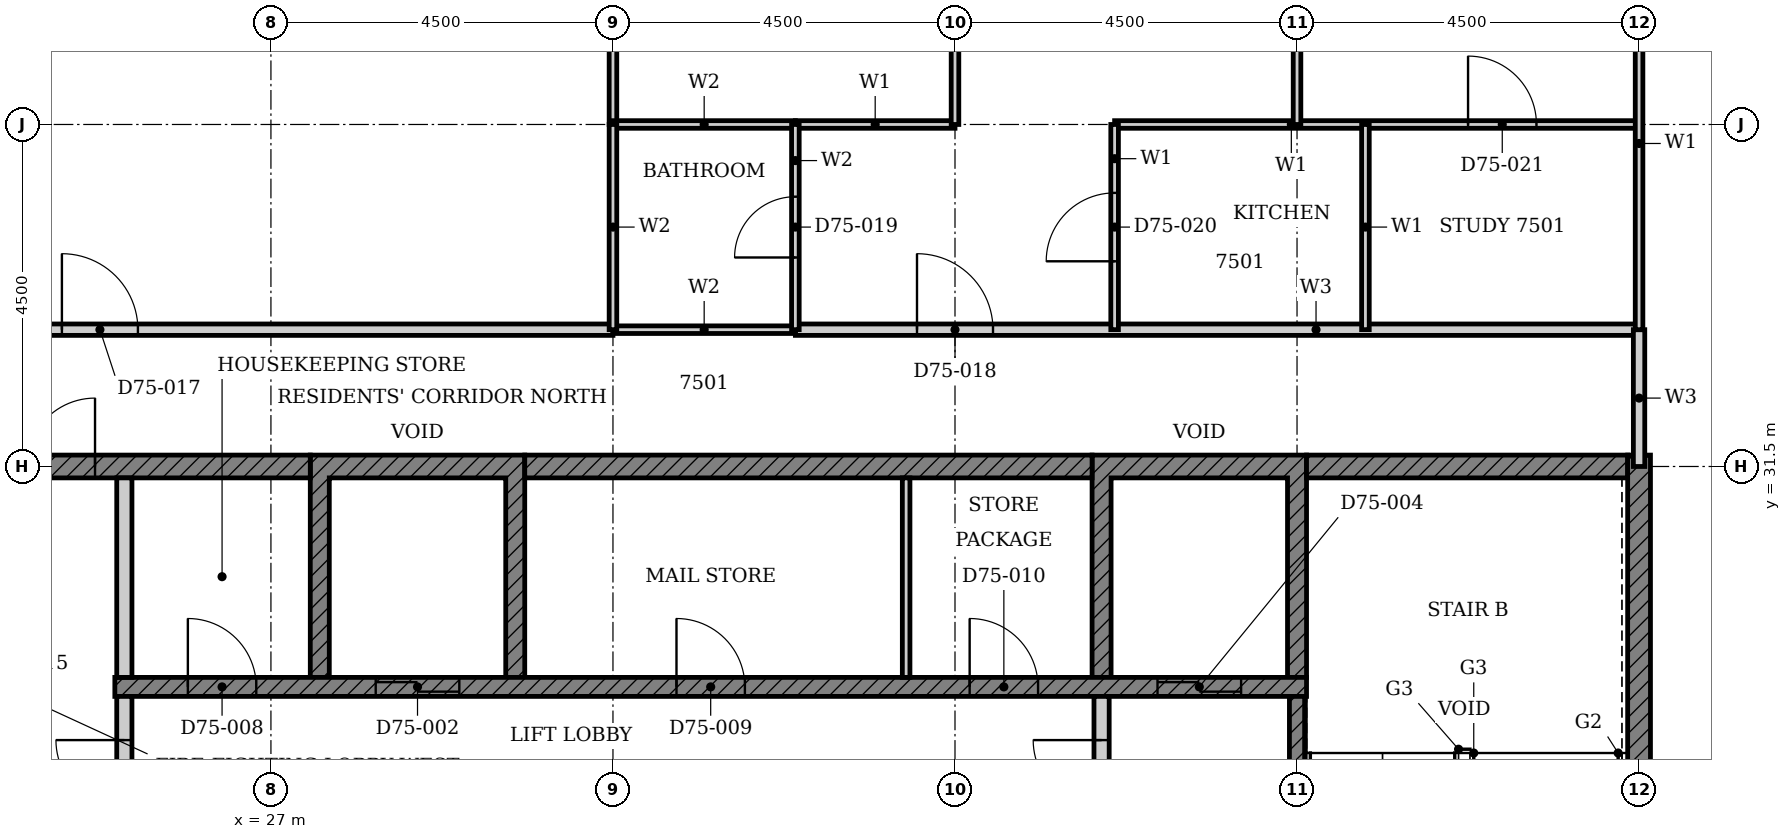
"""IFC4 building model, lengths in metres.
Left out: names, types, materials, properties, quantities, classifications, styles, units other than length and angle.
Written with IfcOpenShell. Run it as: python <this file> out.ifc"""

import sys

from ifc_helpers import new_model, si_unit, direction, frame, frame_2d, origin, place, context, subcontext, project, spatial, polyline, rectangle, outline, extrude, element, fill, save


model = new_model("IFC4")
c1 = context("Model", 3, precision=1e-05, world=origin(), true_north=direction((0.0, 1.0)))
c2 = subcontext(c1, "Body", "Model", "MODEL_VIEW")
j1 = project(units=[si_unit("LENGTHUNIT", "METRE"), si_unit("PLANEANGLEUNIT", "RADIAN")], contexts=[c1])
p1 = place(None, origin())
s1 = spatial("IfcSite", under=j1, at=p1, CompositionType="ELEMENT")
p2 = place(p1, origin())
s2 = spatial("IfcBuilding", under=s1, at=p2, CompositionType="ELEMENT")
p3 = place(p2, frame((0.0, 0.0, 294.5)))
s3 = spatial("IfcBuildingStorey", under=s2, at=p3, CompositionType="ELEMENT", Elevation=294.5)
p4 = place(p3, origin())
e1 = element("IfcWall", 1, at=p4, inside=s3, PredefinedType="SHEAR", context=c2, shape_type="SweptSolid", body=[
    extrude(outline(polyline([(27.518, 28.725), (27.768, 28.725), (27.768, 31.35), (30.089, 31.35), (30.089, 28.725), (30.339, 28.725), (30.339, 31.65), (27.518, 31.65), (27.518, 28.725)])), origin(), (0.0, 0.0, 1.0), 3.4),
])
p5 = place(p3, origin())
e2 = element("IfcWall", 2, at=p5, inside=s3, PredefinedType="SHEAR", context=c2, shape_type="SweptSolid", body=[
    extrude(outline(polyline([(37.803, 28.725), (38.053, 28.725), (38.053, 31.35), (40.375, 31.35), (40.375, 28.725), (40.625, 28.725), (40.625, 31.65), (37.803, 31.65), (37.803, 28.725)])), origin(), (0.0, 0.0, 1.0), 3.4),
])
p6 = place(p3, frame((18.15, 31.5, 0.0), z_axis=(0.0, 0.0, 1.0), x_axis=(1.0, 0.0, 0.0)))
e3 = element("IfcWall", 3, at=p6, inside=s3, PredefinedType="SHEAR", context=c2, shape_type="SweptSolid", body=[
    extrude(rectangle(XDim=9.368, YDim=0.3, at=frame_2d((4.684, 0.0))), origin(), (0.0, 0.0, 1.0), 3.4),
])
p7 = place(p6, frame((4.736, 0.0, 0.0)))
e4 = element("IfcOpeningElement", 4, at=p7, cuts=e3, PredefinedType="OPENING", context=c2, shape_type="SweptSolid", body=[
    extrude(rectangle(XDim=1.8, YDim=2.1, at=frame_2d((0.9, 1.05))), frame((0.0, 0.16, 0.0), z_axis=(0.0, -1.0, 0.0), x_axis=(1.0, 0.0, 0.0)), (0.0, 0.0, 1.0), 0.32),
])
p8 = place(p3, frame((30.339, 31.5, 0.0), z_axis=(0.0, 0.0, 1.0), x_axis=(1.0, 0.0, 0.0)))
e5 = element("IfcWall", 5, at=p8, inside=s3, PredefinedType="SHEAR", context=c2, shape_type="SweptSolid", body=[
    extrude(rectangle(XDim=7.464, YDim=0.3, at=frame_2d((3.732, 0.0))), origin(), (0.0, 0.0, 1.0), 3.4),
])
p9 = place(p3, frame((40.625, 31.5, 0.0), z_axis=(0.0, 0.0, 1.0), x_axis=(1.0, 0.0, 0.0)))
e6 = element("IfcWall", 6, at=p9, inside=s3, PredefinedType="SHEAR", context=c2, shape_type="SweptSolid", body=[
    extrude(rectangle(XDim=4.225, YDim=0.3, at=frame_2d((2.113, 0.0))), origin(), (0.0, 0.0, 1.0), 3.4),
])
p10 = place(p3, frame((45.0, 22.35, 0.0), z_axis=(0.0, 0.0, 1.0), x_axis=(0.0, 1.0, 0.0)))
e7 = element("IfcWall", 7, at=p10, inside=s3, PredefinedType="SHEAR", context=c2, shape_type="SweptSolid", body=[
    extrude(rectangle(XDim=9.3, YDim=0.3, at=frame_2d((4.65, 0.0))), origin(), (0.0, 0.0, 1.0), 3.4),
])
p11 = place(p3, frame((24.947, 28.6, 0.0), z_axis=(0.0, 0.0, 1.0), x_axis=(1.0, 0.0, 0.0)))
e8 = element("IfcWall", 8, at=p11, inside=s3, PredefinedType="SHEAR", context=c2, shape_type="SweptSolid", body=[
    extrude(rectangle(XDim=15.678, YDim=0.25, at=frame_2d((7.839, 0.0))), origin(), (0.0, 0.0, 1.0), 3.4),
])
p12 = place(p11, frame((3.432, 0.0, 0.0)))
e9 = element("IfcOpeningElement", 9, at=p12, cuts=e8, PredefinedType="OPENING", context=c2, shape_type="SweptSolid", body=[
    extrude(rectangle(XDim=1.1, YDim=2.1, at=frame_2d((0.55, 1.05))), frame((0.0, 0.135, 0.0), z_axis=(0.0, -1.0, 0.0), x_axis=(1.0, 0.0, 0.0)), (0.0, 0.0, 1.0), 0.27),
])
p13 = place(p11, frame((13.718, 0.0, 0.0)))
e10 = element("IfcOpeningElement", 10, at=p13, cuts=e8, PredefinedType="OPENING", context=c2, shape_type="SweptSolid", body=[
    extrude(rectangle(XDim=1.1, YDim=2.1, at=frame_2d((0.55, 1.05))), frame((0.0, 0.135, 0.0), z_axis=(0.0, -1.0, 0.0), x_axis=(1.0, 0.0, 0.0)), (0.0, 0.0, 1.0), 0.27),
])
p14 = place(p11, frame((0.961, 0.0, 0.0)))
e11 = element("IfcOpeningElement", 11, at=p14, cuts=e8, PredefinedType="OPENING", context=c2, shape_type="SweptSolid", body=[
    extrude(rectangle(XDim=0.9, YDim=2.1, at=frame_2d((0.45, 1.05))), frame((0.0, 0.135, 0.0), z_axis=(0.0, -1.0, 0.0), x_axis=(1.0, 0.0, 0.0)), (0.0, 0.0, 1.0), 0.27),
])
p15 = place(p11, frame((7.389, 0.0, 0.0)))
e12 = element("IfcOpeningElement", 12, at=p15, cuts=e8, PredefinedType="OPENING", context=c2, shape_type="SweptSolid", body=[
    extrude(rectangle(XDim=0.9, YDim=2.1, at=frame_2d((0.45, 1.05))), frame((0.0, 0.135, 0.0), z_axis=(0.0, -1.0, 0.0), x_axis=(1.0, 0.0, 0.0)), (0.0, 0.0, 1.0), 0.27),
])
p16 = place(p11, frame((11.246, 0.0, 0.0)))
e13 = element("IfcOpeningElement", 13, at=p16, cuts=e8, PredefinedType="OPENING", context=c2, shape_type="SweptSolid", body=[
    extrude(rectangle(XDim=0.9, YDim=2.1, at=frame_2d((0.45, 1.05))), frame((0.0, 0.135, 0.0), z_axis=(0.0, -1.0, 0.0), x_axis=(1.0, 0.0, 0.0)), (0.0, 0.0, 1.0), 0.27),
])
p17 = place(p3, frame((25.072, 28.725, 0.0), z_axis=(0.0, 0.0, 1.0), x_axis=(0.0, 1.0, 0.0)))
e14 = element("IfcWall", 14, at=p17, inside=s3, PredefinedType="PARTITIONING", context=c2, shape_type="SweptSolid", body=[
    extrude(rectangle(XDim=2.625, YDim=0.2, at=frame_2d((1.312, 0.0))), origin(), (0.0, 0.0, 1.0), 3.4),
])
p18 = place(p3, frame((35.357, 28.725, 0.0), z_axis=(0.0, 0.0, 1.0), x_axis=(0.0, 1.0, 0.0)))
e15 = element("IfcWall", 15, at=p18, inside=s3, PredefinedType="PARTITIONING", context=c2, shape_type="SweptSolid", body=[
    extrude(rectangle(XDim=2.625, YDim=0.1, at=frame_2d((1.312, 0.0))), origin(), (0.0, 0.0, 1.0), 3.4),
])
p19 = place(p3, frame((40.5, 22.65, 0.0), z_axis=(0.0, 0.0, 1.0), x_axis=(0.0, 1.0, 0.0)))
e16 = element("IfcWall", 16, at=p19, inside=s3, PredefinedType="SHEAR", context=c2, shape_type="SweptSolid", body=[
    extrude(rectangle(XDim=5.825, YDim=0.2, at=frame_2d((2.913, 0.0))), origin(), (0.0, 0.0, 1.0), 3.4),
])
p20 = place(p19, frame((0.25, 0.0, 0.0)))
e17 = element("IfcOpeningElement", 17, at=p20, cuts=e16, PredefinedType="OPENING", context=c2, shape_type="SweptSolid", body=[
    extrude(rectangle(XDim=1.8, YDim=2.1, at=frame_2d((0.9, 1.05))), frame((0.0, 0.11, 0.0), z_axis=(0.0, -1.0, 0.0), x_axis=(1.0, 0.0, 0.0)), (0.0, 0.0, 1.0), 0.22),
])
p21 = place(p3, frame((25.072, 25.525, 0.0), z_axis=(0.0, 0.0, 1.0), x_axis=(0.0, 1.0, 0.0)))
e18 = element("IfcWall", 18, at=p21, inside=s3, PredefinedType="PARTITIONING", context=c2, shape_type="SweptSolid", body=[
    extrude(rectangle(XDim=2.95, YDim=0.2, at=frame_2d((1.475, 0.0))), origin(), (0.0, 0.0, 1.0), 3.4),
])
p22 = place(p21, frame((0.575, 0.0, 0.0)))
e19 = element("IfcOpeningElement", 19, at=p22, cuts=e18, PredefinedType="OPENING", context=c2, shape_type="SweptSolid", body=[
    extrude(rectangle(XDim=1.8, YDim=2.1, at=frame_2d((0.9, 1.05))), frame((0.0, 0.11, 0.0), z_axis=(0.0, -1.0, 0.0), x_axis=(1.0, 0.0, 0.0)), (0.0, 0.0, 1.0), 0.22),
])
p23 = place(p3, frame((37.928, 25.525, 0.0), z_axis=(0.0, 0.0, 1.0), x_axis=(0.0, 1.0, 0.0)))
e20 = element("IfcWall", 20, at=p23, inside=s3, PredefinedType="PARTITIONING", context=c2, shape_type="SweptSolid", body=[
    extrude(rectangle(XDim=2.95, YDim=0.2, at=frame_2d((1.475, 0.0))), origin(), (0.0, 0.0, 1.0), 3.4),
])
p24 = place(p23, frame((0.575, 0.0, 0.0)))
e21 = element("IfcOpeningElement", 21, at=p24, cuts=e20, PredefinedType="OPENING", context=c2, shape_type="SweptSolid", body=[
    extrude(rectangle(XDim=1.8, YDim=2.1, at=frame_2d((0.9, 1.05))), frame((0.0, 0.11, 0.0), z_axis=(0.0, -1.0, 0.0), x_axis=(1.0, 0.0, 0.0)), (0.0, 0.0, 1.0), 0.22),
])
p25 = place(p3, frame((18.0, 33.3, 0.0), z_axis=(0.0, 0.0, 1.0), x_axis=(1.0, 0.0, 0.0)))
e22 = element("IfcWall", 22, at=p25, inside=s3, PredefinedType="PARTITIONING", context=c2, shape_type="SweptSolid", body=[
    extrude(rectangle(XDim=13.5, YDim=0.15, at=frame_2d((6.75, 0.0))), origin(), (0.0, 0.0, 1.0), 3.4),
])
p26 = place(p25, frame((6.25, 0.0, 0.0)))
e23 = element("IfcOpeningElement", 23, at=p26, cuts=e22, PredefinedType="OPENING", context=c2, shape_type="SweptSolid", body=[
    extrude(rectangle(XDim=1.0, YDim=2.1, at=frame_2d((0.5, 1.05))), frame((0.0, 0.085, 0.0), z_axis=(0.0, -1.0, 0.0), x_axis=(1.0, 0.0, 0.0)), (0.0, 0.0, 1.0), 0.17),
])
p27 = place(p3, frame((33.9, 33.3, 0.0), z_axis=(0.0, 0.0, 1.0), x_axis=(1.0, 0.0, 0.0)))
e24 = element("IfcWall", 24, at=p27, inside=s3, PredefinedType="PARTITIONING", context=c2, shape_type="SweptSolid", body=[
    extrude(rectangle(XDim=11.1, YDim=0.15, at=frame_2d((5.55, 0.0))), origin(), (0.0, 0.0, 1.0), 3.4),
])
p28 = place(p27, frame((1.6, 0.0, 0.0)))
e25 = element("IfcOpeningElement", 25, at=p28, cuts=e24, PredefinedType="OPENING", context=c2, shape_type="SweptSolid", body=[
    extrude(rectangle(XDim=1.0, YDim=2.2, at=frame_2d((0.5, 1.1))), frame((0.0, 0.085, 0.0), z_axis=(0.0, -1.0, 0.0), x_axis=(1.0, 0.0, 0.0)), (0.0, 0.0, 1.0), 0.17),
])
p29 = place(p3, frame((45.0, 31.5, 0.0), z_axis=(0.0, 0.0, 1.0), x_axis=(0.0, 1.0, 0.0)))
e26 = element("IfcWall", 26, at=p29, inside=s3, PredefinedType="PARTITIONING", context=c2, shape_type="SweptSolid", body=[
    extrude(rectangle(XDim=1.8, YDim=0.15, at=frame_2d((0.9, 0.0))), origin(), (0.0, 0.0, 1.0), 3.4),
])
p30 = place(p3, frame((33.9, 36.0, 0.0), z_axis=(0.0, 0.0, 1.0), x_axis=(1.0, 0.0, 0.0)))
e27 = element("IfcWall", 27, at=p30, inside=s3, PredefinedType="PARTITIONING", context=c2, shape_type="SweptSolid", body=[
    extrude(rectangle(XDim=2.1, YDim=0.1, at=frame_2d((1.05, 0.0))), origin(), (0.0, 0.0, 1.0), 3.4),
])
p31 = place(p3, frame((38.1, 36.0, 0.0), z_axis=(0.0, 0.0, 1.0), x_axis=(1.0, 0.0, 0.0)))
e28 = element("IfcWall", 28, at=p31, inside=s3, PredefinedType="PARTITIONING", context=c2, shape_type="SweptSolid", body=[
    extrude(rectangle(XDim=6.9, YDim=0.1, at=frame_2d((3.45, 0.0))), origin(), (0.0, 0.0, 1.0), 3.4),
])
p32 = place(p31, frame((4.65, 0.0, 0.0)))
e29 = element("IfcOpeningElement", 29, at=p32, cuts=e28, PredefinedType="OPENING", context=c2, shape_type="SweptSolid", body=[
    extrude(rectangle(XDim=0.9, YDim=2.1, at=frame_2d((0.45, 1.05))), frame((0.0, 0.06, 0.0), z_axis=(0.0, -1.0, 0.0), x_axis=(1.0, 0.0, 0.0)), (0.0, 0.0, 1.0), 0.12),
])
p33 = place(p3, frame((31.5, 36.0, 0.0), z_axis=(0.0, 0.0, 1.0), x_axis=(0.0, 1.0, 0.0)))
e30 = element("IfcWall", 30, at=p33, inside=s3, PredefinedType="PARTITIONING", context=c2, shape_type="SweptSolid", body=[
    extrude(rectangle(XDim=4.74, YDim=0.1, at=frame_2d((2.37, 0.0))), origin(), (0.0, 0.0, 1.0), 3.4),
])
p34 = place(p3, frame((36.0, 36.0, 0.0), z_axis=(0.0, 0.0, 1.0), x_axis=(0.0, 1.0, 0.0)))
e31 = element("IfcWall", 31, at=p34, inside=s3, PredefinedType="PARTITIONING", context=c2, shape_type="SweptSolid", body=[
    extrude(rectangle(XDim=4.69, YDim=0.1, at=frame_2d((2.345, 0.0))), origin(), (0.0, 0.0, 1.0), 3.4),
])
p35 = place(p34, frame((1.8, 0.0, 0.0)))
e32 = element("IfcOpeningElement", 32, at=p35, cuts=e31, PredefinedType="OPENING", context=c2, shape_type="SweptSolid", body=[
    extrude(rectangle(XDim=0.9, YDim=2.1, at=frame_2d((0.45, 1.05))), frame((0.0, 0.06, 0.0), z_axis=(0.0, -1.0, 0.0), x_axis=(1.0, 0.0, 0.0)), (0.0, 0.0, 1.0), 0.12),
])
p36 = place(p3, frame((38.1, 33.3, 0.0), z_axis=(0.0, 0.0, 1.0), x_axis=(0.0, 1.0, 0.0)))
e33 = element("IfcWall", 33, at=p36, inside=s3, PredefinedType="PARTITIONING", context=c2, shape_type="SweptSolid", body=[
    extrude(rectangle(XDim=2.7, YDim=0.1, at=frame_2d((1.35, 0.0))), origin(), (0.0, 0.0, 1.0), 3.4),
])
p37 = place(p36, frame((0.9, 0.0, 0.0)))
e34 = element("IfcOpeningElement", 34, at=p37, cuts=e33, PredefinedType="OPENING", context=c2, shape_type="SweptSolid", body=[
    extrude(rectangle(XDim=0.9, YDim=2.1, at=frame_2d((0.45, 1.05))), frame((0.0, 0.06, 0.0), z_axis=(0.0, -1.0, 0.0), x_axis=(1.0, 0.0, 0.0)), (0.0, 0.0, 1.0), 0.12),
])
p38 = place(p3, frame((40.5, 36.0, 0.0), z_axis=(0.0, 0.0, 1.0), x_axis=(0.0, 1.0, 0.0)))
e35 = element("IfcWall", 35, at=p38, inside=s3, PredefinedType="PARTITIONING", context=c2, shape_type="SweptSolid", body=[
    extrude(rectangle(XDim=4.74, YDim=0.1, at=frame_2d((2.37, 0.0))), origin(), (0.0, 0.0, 1.0), 3.4),
])
p39 = place(p38, frame((1.8, 0.0, 0.0)))
e36 = element("IfcOpeningElement", 36, at=p39, cuts=e35, PredefinedType="OPENING", context=c2, shape_type="SweptSolid", body=[
    extrude(rectangle(XDim=0.9, YDim=2.1, at=frame_2d((0.45, 1.05))), frame((0.0, 0.06, 0.0), z_axis=(0.0, -1.0, 0.0), x_axis=(1.0, 0.0, 0.0)), (0.0, 0.0, 1.0), 0.12),
])
p40 = place(p3, frame((41.4, 33.3, 0.0), z_axis=(0.0, 0.0, 1.0), x_axis=(0.0, 1.0, 0.0)))
e37 = element("IfcWall", 37, at=p40, inside=s3, PredefinedType="PARTITIONING", context=c2, shape_type="SweptSolid", body=[
    extrude(rectangle(XDim=2.7, YDim=0.1, at=frame_2d((1.35, 0.0))), origin(), (0.0, 0.0, 1.0), 3.4),
])
p41 = place(p3, frame((45.0, 33.3, 0.0), z_axis=(0.0, 0.0, 1.0), x_axis=(0.0, 1.0, 0.0)))
e38 = element("IfcWall", 38, at=p41, inside=s3, PredefinedType="PARTITIONING", context=c2, shape_type="SweptSolid", body=[
    extrude(rectangle(XDim=4.9, YDim=0.1, at=frame_2d((2.45, 0.0))), origin(), (0.0, 0.0, 1.0), 3.4),
])
for number, where, z_axis, x_axis in (
    (39, (31.5, 33.3, 0.0), (0.0, 0.0, 1.0), (1.0, 0.0, 0.0)),
    (40, (31.5, 36.0, 0.0), (0.0, 0.0, 1.0), (1.0, 0.0, 0.0)),
):
    element("IfcWall", number, at=place(p3, frame(where, z_axis=z_axis, x_axis=x_axis)), inside=s3, PredefinedType="PARTITIONING", context=c2, shape_type="SweptSolid", body=[
        extrude(rectangle(XDim=2.4, YDim=0.1, at=frame_2d((1.2, 0.0))), origin(), (0.0, 0.0, 1.0), 3.4),
    ])
p42 = place(p3, frame((31.5, 33.3, 0.0), z_axis=(0.0, 0.0, 1.0), x_axis=(0.0, 1.0, 0.0)))
e41 = element("IfcWall", 41, at=p42, inside=s3, PredefinedType="PARTITIONING", context=c2, shape_type="SweptSolid", body=[
    extrude(rectangle(XDim=2.7, YDim=0.1, at=frame_2d((1.35, 0.0))), origin(), (0.0, 0.0, 1.0), 3.4),
])
p43 = place(p3, frame((33.9, 33.3, 0.0), z_axis=(0.0, 0.0, 1.0), x_axis=(0.0, 1.0, 0.0)))
e42 = element("IfcWall", 42, at=p43, inside=s3, PredefinedType="PARTITIONING", context=c2, shape_type="SweptSolid", body=[
    extrude(rectangle(XDim=2.7, YDim=0.1, at=frame_2d((1.35, 0.0))), origin(), (0.0, 0.0, 1.0), 3.4),
])
p44 = place(p43, frame((0.95, 0.0, 0.0)))
e43 = element("IfcOpeningElement", 43, at=p44, cuts=e42, PredefinedType="OPENING", context=c2, shape_type="SweptSolid", body=[
    extrude(rectangle(XDim=0.8, YDim=2.1, at=frame_2d((0.4, 1.05))), frame((0.0, 0.06, 0.0), z_axis=(0.0, -1.0, 0.0), x_axis=(1.0, 0.0, 0.0)), (0.0, 0.0, 1.0), 0.12),
])
p45 = place(p12, origin())
e44 = element("IfcDoor", 44, at=p45, inside=s3, OperationType="DOUBLE_DOOR_SLIDING", PredefinedType="DOOR", context=c2, shape_type="SweptSolid", body=[
    extrude(rectangle(XDim=1.1, YDim=2.1, at=frame_2d((0.55, 1.05))), frame((0.0, 0.025, 0.0), z_axis=(0.0, -1.0, 0.0), x_axis=(1.0, 0.0, 0.0)), (0.0, 0.0, 1.0), 0.05),
])
fill(e9, e44)
p46 = place(p13, origin())
e45 = element("IfcDoor", 45, at=p46, inside=s3, OperationType="DOUBLE_DOOR_SLIDING", PredefinedType="DOOR", context=c2, shape_type="SweptSolid", body=[
    extrude(rectangle(XDim=1.1, YDim=2.1, at=frame_2d((0.55, 1.05))), frame((0.0, 0.025, 0.0), z_axis=(0.0, -1.0, 0.0), x_axis=(1.0, 0.0, 0.0)), (0.0, 0.0, 1.0), 0.05),
])
fill(e10, e45)
p47 = place(p14, origin())
e46 = element("IfcDoor", 46, at=p47, inside=s3, OperationType="SINGLE_SWING_LEFT", PredefinedType="DOOR", context=c2, shape_type="SweptSolid", body=[
    extrude(rectangle(XDim=0.9, YDim=2.1, at=frame_2d((0.45, 1.05))), frame((0.0, 0.025, 0.0), z_axis=(0.0, -1.0, 0.0), x_axis=(1.0, 0.0, 0.0)), (0.0, 0.0, 1.0), 0.05),
])
fill(e11, e46)
p48 = place(p15, origin())
e47 = element("IfcDoor", 47, at=p48, inside=s3, OperationType="SINGLE_SWING_LEFT", PredefinedType="DOOR", context=c2, shape_type="SweptSolid", body=[
    extrude(rectangle(XDim=0.9, YDim=2.1, at=frame_2d((0.45, 1.05))), frame((0.0, 0.025, 0.0), z_axis=(0.0, -1.0, 0.0), x_axis=(1.0, 0.0, 0.0)), (0.0, 0.0, 1.0), 0.05),
])
fill(e12, e47)
p49 = place(p16, origin())
e48 = element("IfcDoor", 48, at=p49, inside=s3, OperationType="SINGLE_SWING_LEFT", PredefinedType="DOOR", context=c2, shape_type="SweptSolid", body=[
    extrude(rectangle(XDim=0.9, YDim=2.1, at=frame_2d((0.45, 1.05))), frame((0.0, 0.025, 0.0), z_axis=(0.0, -1.0, 0.0), x_axis=(1.0, 0.0, 0.0)), (0.0, 0.0, 1.0), 0.05),
])
fill(e13, e48)
p50 = place(p22, origin())
e49 = element("IfcDoor", 49, at=p50, inside=s3, OperationType="DOUBLE_DOOR_SINGLE_SWING", PredefinedType="DOOR", context=c2, shape_type="SweptSolid", body=[
    extrude(rectangle(XDim=1.8, YDim=2.1, at=frame_2d((0.9, 1.05))), frame((0.0, 0.025, 0.0), z_axis=(0.0, -1.0, 0.0), x_axis=(1.0, 0.0, 0.0)), (0.0, 0.0, 1.0), 0.05),
])
fill(e19, e49)
p51 = place(p24, origin())
e50 = element("IfcDoor", 50, at=p51, inside=s3, OperationType="DOUBLE_DOOR_SINGLE_SWING", PredefinedType="DOOR", context=c2, shape_type="SweptSolid", body=[
    extrude(rectangle(XDim=1.8, YDim=2.1, at=frame_2d((0.9, 1.05))), frame((0.0, 0.025, 0.0), z_axis=(0.0, -1.0, 0.0), x_axis=(1.0, 0.0, 0.0)), (0.0, 0.0, 1.0), 0.05),
])
fill(e21, e50)
p52 = place(p7, origin())
e51 = element("IfcDoor", 51, at=p52, inside=s3, OperationType="DOUBLE_DOOR_SINGLE_SWING", PredefinedType="DOOR", context=c2, shape_type="SweptSolid", body=[
    extrude(rectangle(XDim=1.8, YDim=2.1, at=frame_2d((0.9, 1.05))), frame((0.0, 0.025, 0.0), z_axis=(0.0, -1.0, 0.0), x_axis=(1.0, 0.0, 0.0)), (0.0, 0.0, 1.0), 0.05),
])
fill(e4, e51)
p53 = place(p26, origin())
e52 = element("IfcDoor", 52, at=p53, inside=s3, OperationType="SINGLE_SWING_LEFT", PredefinedType="DOOR", context=c2, shape_type="SweptSolid", body=[
    extrude(rectangle(XDim=1.0, YDim=2.1, at=frame_2d((0.5, 1.05))), frame((0.0, 0.025, 0.0), z_axis=(0.0, -1.0, 0.0), x_axis=(1.0, 0.0, 0.0)), (0.0, 0.0, 1.0), 0.05),
])
fill(e23, e52)
p54 = place(p28, origin())
e53 = element("IfcDoor", 53, at=p54, inside=s3, OperationType="SINGLE_SWING_RIGHT", PredefinedType="DOOR", context=c2, shape_type="SweptSolid", body=[
    extrude(rectangle(XDim=1.0, YDim=2.2, at=frame_2d((0.5, 1.1))), frame((0.0, 0.025, 0.0), z_axis=(0.0, -1.0, 0.0), x_axis=(1.0, 0.0, 0.0)), (0.0, 0.0, 1.0), 0.05),
])
fill(e25, e53)
p55 = place(p44, origin())
e54 = element("IfcDoor", 54, at=p55, inside=s3, OperationType="SINGLE_SWING_RIGHT", PredefinedType="DOOR", context=c2, shape_type="SweptSolid", body=[
    extrude(rectangle(XDim=0.8, YDim=2.1, at=frame_2d((0.4, 1.05))), frame((0.0, 0.025, 0.0), z_axis=(0.0, -1.0, 0.0), x_axis=(1.0, 0.0, 0.0)), (0.0, 0.0, 1.0), 0.05),
])
fill(e43, e54)
p56 = place(p37, origin())
e55 = element("IfcDoor", 55, at=p56, inside=s3, OperationType="SINGLE_SWING_RIGHT", PredefinedType="DOOR", context=c2, shape_type="SweptSolid", body=[
    extrude(rectangle(XDim=0.9, YDim=2.1, at=frame_2d((0.45, 1.05))), frame((0.0, 0.025, 0.0), z_axis=(0.0, -1.0, 0.0), x_axis=(1.0, 0.0, 0.0)), (0.0, 0.0, 1.0), 0.05),
])
fill(e34, e55)
p57 = place(p32, origin())
e56 = element("IfcDoor", 56, at=p57, inside=s3, OperationType="SINGLE_SWING_LEFT", PredefinedType="DOOR", context=c2, shape_type="SweptSolid", body=[
    extrude(rectangle(XDim=0.9, YDim=2.1, at=frame_2d((0.45, 1.05))), frame((0.0, 0.025, 0.0), z_axis=(0.0, -1.0, 0.0), x_axis=(1.0, 0.0, 0.0)), (0.0, 0.0, 1.0), 0.05),
])
fill(e29, e56)
save(model, sys.argv[1])
